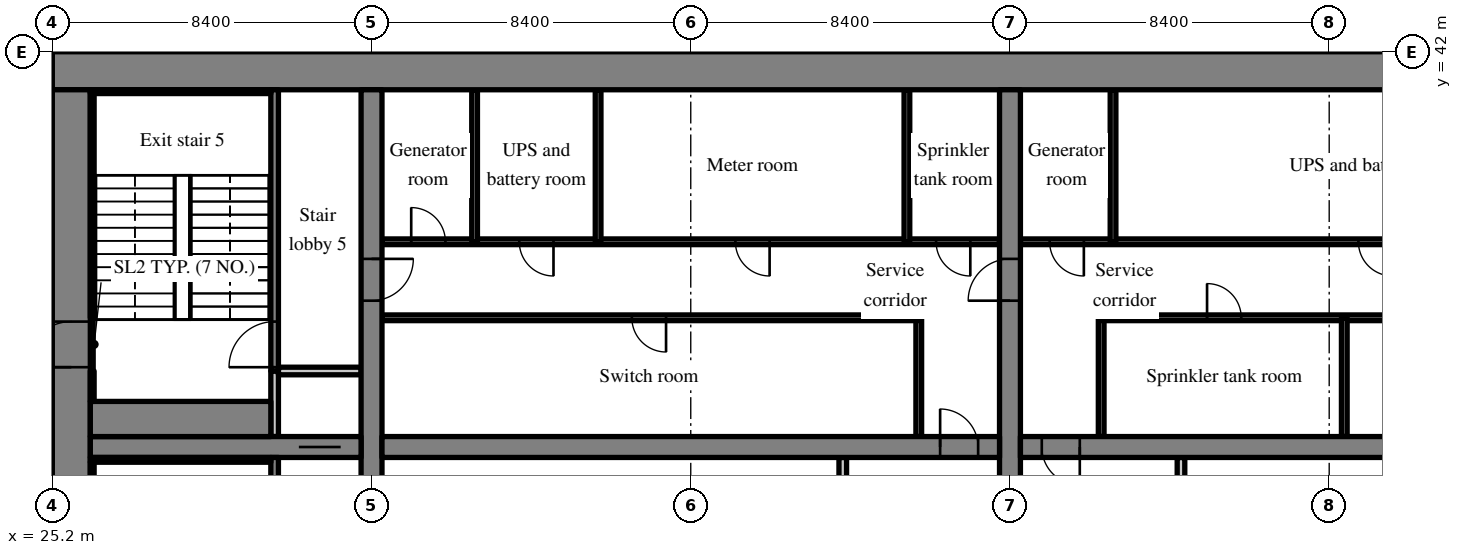
"""IFC4 building model, lengths in metres.
Left out: names, types, materials, properties, quantities, classifications, styles, units other than length and angle.
Written with IfcOpenShell. Run it as: python <this file> out.ifc"""

import sys

from ifc_helpers import new_model, si_unit, direction, frame, frame_2d, origin, place, context, subcontext, project, spatial, rectangle, extrude, source, transform, mapped, element, fill, save


model = new_model("IFC4")
c1 = context("Model", 3, precision=1e-05, world=origin(), true_north=direction((0.0, 1.0)))
c2 = subcontext(c1, "Body", "Model", "MODEL_VIEW")
j1 = project(units=[si_unit("LENGTHUNIT", "METRE"), si_unit("PLANEANGLEUNIT", "RADIAN")], contexts=[c1])
p1 = place(None, origin())
s1 = spatial("IfcSite", under=j1, at=p1, CompositionType="ELEMENT")
p2 = place(p1, origin())
s2 = spatial("IfcBuilding", under=s1, at=p2, CompositionType="ELEMENT")
p3 = place(p2, frame((0.0, 0.0, 81.0)))
s3 = spatial("IfcBuildingStorey", under=s2, at=p3, CompositionType="ELEMENT", Elevation=81.0)
m1 = source(origin(), c2, "Body", "SweptSolid", [
    extrude(rectangle(XDim=50.4, YDim=1.0, at=frame_2d((25.2, 0.0))), origin(), (0.0, 0.0, 1.0), 5.12),
])
p4 = place(p3, frame((25.2, 41.5, 0.0), z_axis=(0.0, 0.0, 1.0), x_axis=(1.0, 0.0, 0.0)))
e1 = element("IfcWall", 1, at=p4, inside=s3, PredefinedType="SHEAR", context=c2, shape_type="MappedRepresentation", body=[
    mapped(m1, transform((0.0, 0.0, 0.0), scale=1.0)),
])
m2 = source(origin(), c2, "Body", "SweptSolid", [
    extrude(rectangle(XDim=18.0, YDim=1.0, at=frame_2d((9.0, 0.0))), origin(), (0.0, 0.0, 1.0), 5.12),
])
p5 = place(p3, frame((25.7, 23.0, 0.0), z_axis=(0.0, 0.0, 1.0), x_axis=(0.0, 1.0, 0.0)))
e2 = element("IfcWall", 2, at=p5, inside=s3, PredefinedType="SHEAR", context=c2, shape_type="MappedRepresentation", body=[
    mapped(m2, transform((0.0, 0.0, 0.0), scale=1.0)),
])
m3 = source(origin(), c2, "Body", "SweptSolid", [
    extrude(rectangle(XDim=1.2, YDim=2.1, at=frame_2d((0.6, 1.05))), frame((0.0, 0.51, 0.0), z_axis=(0.0, -1.0, 0.0), x_axis=(1.0, 0.0, 0.0)), (0.0, 0.0, 1.0), 1.02),
])
p6 = place(p5, frame((10.7, 0.0, 0.0)))
e3 = element("IfcOpeningElement", 3, at=p6, cuts=e2, PredefinedType="OPENING", context=c2, shape_type="MappedRepresentation", body=[
    mapped(m3, transform((0.0, 0.0, 0.0), scale=1.0)),
])
m4 = source(origin(), c2, "Body", "SweptSolid", [
    extrude(rectangle(XDim=18.0, YDim=0.55, at=frame_2d((9.0, 0.0))), origin(), (0.0, 0.0, 1.0), 5.12),
])
p7 = place(p3, frame((33.6, 23.0, 0.0), z_axis=(0.0, 0.0, 1.0), x_axis=(0.0, 1.0, 0.0)))
e4 = element("IfcWall", 4, at=p7, inside=s3, PredefinedType="SHEAR", context=c2, shape_type="MappedRepresentation", body=[
    mapped(m4, transform((0.0, 0.0, 0.0), scale=1.0)),
])
m5 = source(origin(), c2, "Body", "SweptSolid", [
    extrude(rectangle(XDim=1.1, YDim=2.1, at=frame_2d((0.55, 1.05))), frame((0.0, 0.285, 0.0), z_axis=(0.0, -1.0, 0.0), x_axis=(1.0, 0.0, 0.0)), (0.0, 0.0, 1.0), 0.57),
])
p8 = place(p7, frame((12.45, 0.0, 0.0)))
e5 = element("IfcOpeningElement", 5, at=p8, cuts=e4, PredefinedType="OPENING", context=c2, shape_type="MappedRepresentation", body=[
    mapped(m5, transform((0.0, 0.0, 0.0), scale=1.0)),
])
p9 = place(p3, frame((50.4, 23.0, 0.0), z_axis=(0.0, 0.0, 1.0), x_axis=(0.0, 1.0, 0.0)))
e6 = element("IfcWall", 6, at=p9, inside=s3, PredefinedType="SHEAR", context=c2, shape_type="MappedRepresentation", body=[
    mapped(m4, transform((0.0, 0.0, 0.0), scale=1.0)),
])
p10 = place(p9, frame((12.45, 0.0, 0.0)))
e7 = element("IfcOpeningElement", 7, at=p10, cuts=e6, PredefinedType="OPENING", context=c2, shape_type="MappedRepresentation", body=[
    mapped(m5, transform((0.0, 0.0, 0.0), scale=1.0)),
])
m6 = source(origin(), c2, "Body", "SweptSolid", [
    extrude(rectangle(XDim=7.125, YDim=0.55, at=frame_2d((3.562, 0.0))), origin(), (0.0, 0.0, 1.0), 5.12),
])
p11 = place(p3, frame((26.2, 31.6, 0.0), z_axis=(0.0, 0.0, 1.0), x_axis=(1.0, 0.0, 0.0)))
e8 = element("IfcWall", 8, at=p11, inside=s3, PredefinedType="SHEAR", context=c2, shape_type="MappedRepresentation", body=[
    mapped(m6, transform((0.0, 0.0, 0.0), scale=1.0)),
])
p12 = place(p11, frame((5.488, 0.0, 0.0)))
e9 = element("IfcOpeningElement", 9, at=p12, cuts=e8, PredefinedType="OPENING", context=c2, shape_type="MappedRepresentation", body=[
    mapped(m5, transform((0.0, 0.0, 0.0), scale=1.0)),
])
m7 = source(origin(), c2, "Body", "SweptSolid", [
    extrude(rectangle(XDim=16.25, YDim=0.55, at=frame_2d((8.125, 0.0))), origin(), (0.0, 0.0, 1.0), 5.12),
])
p13 = place(p3, frame((33.875, 31.6, 0.0), z_axis=(0.0, 0.0, 1.0), x_axis=(1.0, 0.0, 0.0)))
e10 = element("IfcWall", 10, at=p13, inside=s3, PredefinedType="SHEAR", context=c2, shape_type="MappedRepresentation", body=[
    mapped(m7, transform((0.0, 0.0, 0.0), scale=1.0)),
])
m8 = source(origin(), c2, "Body", "SweptSolid", [
    extrude(rectangle(XDim=1.0, YDim=2.1, at=frame_2d((0.5, 1.05))), frame((0.0, 0.285, 0.0), z_axis=(0.0, -1.0, 0.0), x_axis=(1.0, 0.0, 0.0)), (0.0, 0.0, 1.0), 0.57),
])
p14 = place(p13, frame((14.687, 0.0, 0.0)))
e11 = element("IfcOpeningElement", 11, at=p14, cuts=e10, PredefinedType="OPENING", context=c2, shape_type="MappedRepresentation", body=[
    mapped(m8, transform((0.0, 0.0, 0.0), scale=1.0)),
])
p15 = place(p3, frame((50.675, 31.6, 0.0), z_axis=(0.0, 0.0, 1.0), x_axis=(1.0, 0.0, 0.0)))
e12 = element("IfcWall", 12, at=p15, inside=s3, PredefinedType="SHEAR", context=c2, shape_type="MappedRepresentation", body=[
    mapped(m7, transform((0.0, 0.0, 0.0), scale=1.0)),
])
p16 = place(p15, frame((0.562, 0.0, 0.0)))
e13 = element("IfcOpeningElement", 13, at=p16, cuts=e12, PredefinedType="OPENING", context=c2, shape_type="MappedRepresentation", body=[
    mapped(m8, transform((0.0, 0.0, 0.0), scale=1.0)),
])
m9 = source(origin(), c2, "Body", "SweptSolid", [
    extrude(rectangle(XDim=8.2, YDim=0.9, at=frame_2d((4.1, 0.0))), origin(), (0.0, 0.0, 1.0), 5.12),
])
p17 = place(p3, frame((17.0, 31.6, 0.0), z_axis=(0.0, 0.0, 1.0), x_axis=(1.0, 0.0, 0.0)))
e14 = element("IfcWall", 14, at=p17, inside=s3, PredefinedType="SHEAR", context=c2, shape_type="MappedRepresentation", body=[
    mapped(m9, transform((0.0, 0.0, 0.0), scale=1.0)),
])
m10 = source(origin(), c2, "Body", "SweptSolid", [
    extrude(rectangle(XDim=2.525, YDim=0.2, at=frame_2d((1.262, 0.0))), origin(), (0.0, 0.0, 1.0), 5.12),
])
p18 = place(p3, frame((46.0, 28.8, 0.0), z_axis=(0.0, 0.0, 1.0), x_axis=(0.0, 1.0, 0.0)))
e15 = element("IfcWall", 15, at=p18, inside=s3, PredefinedType="SOLIDWALL", context=c2, shape_type="MappedRepresentation", body=[
    mapped(m10, transform((0.0, 0.0, 0.0), scale=1.0)),
])
m11 = source(origin(), c2, "Body", "SweptSolid", [
    extrude(rectangle(XDim=3.125, YDim=0.15, at=frame_2d((1.562, 0.0))), origin(), (0.0, 0.0, 1.0), 5.12),
])
p19 = place(p3, frame((48.0, 31.875, 0.0), z_axis=(0.0, 0.0, 1.0), x_axis=(0.0, 1.0, 0.0)))
e16 = element("IfcWall", 16, at=p19, inside=s3, PredefinedType="PARTITIONING", context=c2, shape_type="MappedRepresentation", body=[
    mapped(m11, transform((0.0, 0.0, 0.0), scale=1.0)),
])
m12 = source(origin(), c2, "Body", "SweptSolid", [
    extrude(rectangle(XDim=14.125, YDim=0.15, at=frame_2d((7.062, 0.0))), origin(), (0.0, 0.0, 1.0), 5.12),
])
p20 = place(p3, frame((33.875, 35.0, 0.0), z_axis=(0.0, 0.0, 1.0), x_axis=(1.0, 0.0, 0.0)))
e17 = element("IfcWall", 17, at=p20, inside=s3, PredefinedType="PARTITIONING", context=c2, shape_type="MappedRepresentation", body=[
    mapped(m12, transform((0.0, 0.0, 0.0), scale=1.0)),
])
m13 = source(origin(), c2, "Body", "SweptSolid", [
    extrude(rectangle(XDim=0.9, YDim=2.1, at=frame_2d((0.45, 1.05))), frame((0.0, 0.085, 0.0), z_axis=(0.0, -1.0, 0.0), x_axis=(1.0, 0.0, 0.0)), (0.0, 0.0, 1.0), 0.17),
])
p21 = place(p20, frame((6.575, 0.0, 0.0)))
e18 = element("IfcOpeningElement", 18, at=p21, cuts=e17, PredefinedType="OPENING", context=c2, shape_type="MappedRepresentation", body=[
    mapped(m13, transform((0.0, 0.0, 0.0), scale=1.0)),
])
m14 = source(origin(), c2, "Body", "SweptSolid", [
    extrude(rectangle(XDim=16.25, YDim=0.15, at=frame_2d((8.125, 0.0))), origin(), (0.0, 0.0, 1.0), 5.12),
])
p22 = place(p3, frame((33.875, 37.0, 0.0), z_axis=(0.0, 0.0, 1.0), x_axis=(1.0, 0.0, 0.0)))
e19 = element("IfcWall", 19, at=p22, inside=s3, PredefinedType="PARTITIONING", context=c2, shape_type="MappedRepresentation", body=[
    mapped(m14, transform((0.0, 0.0, 0.0), scale=1.0)),
])
p23 = place(p22, frame((0.769, 0.0, 0.0)))
e20 = element("IfcOpeningElement", 20, at=p23, cuts=e19, PredefinedType="OPENING", context=c2, shape_type="MappedRepresentation", body=[
    mapped(m13, transform((0.0, 0.0, 0.0), scale=1.0)),
])
p24 = place(p22, frame((3.613, 0.0, 0.0)))
e21 = element("IfcOpeningElement", 21, at=p24, cuts=e19, PredefinedType="OPENING", context=c2, shape_type="MappedRepresentation", body=[
    mapped(m13, transform((0.0, 0.0, 0.0), scale=1.0)),
])
p25 = place(p22, frame((9.3, 0.0, 0.0)))
e22 = element("IfcOpeningElement", 22, at=p25, cuts=e19, PredefinedType="OPENING", context=c2, shape_type="MappedRepresentation", body=[
    mapped(m13, transform((0.0, 0.0, 0.0), scale=1.0)),
])
p26 = place(p22, frame((14.581, 0.0, 0.0)))
e23 = element("IfcOpeningElement", 23, at=p26, cuts=e19, PredefinedType="OPENING", context=c2, shape_type="MappedRepresentation", body=[
    mapped(m13, transform((0.0, 0.0, 0.0), scale=1.0)),
])
m15 = source(origin(), c2, "Body", "SweptSolid", [
    extrude(rectangle(XDim=4.0, YDim=0.15, at=frame_2d((2.0, 0.0))), origin(), (0.0, 0.0, 1.0), 5.12),
])
for number, where, z_axis, x_axis in (
    (24, (36.312, 37.0, 0.0), (0.0, 0.0, 1.0), (0.0, 1.0, 0.0)),
    (25, (39.562, 37.0, 0.0), (0.0, 0.0, 1.0), (0.0, 1.0, 0.0)),
    (26, (47.688, 37.0, 0.0), (0.0, 0.0, 1.0), (0.0, 1.0, 0.0)),
):
    element("IfcWall", number, at=place(p3, frame(where, z_axis=z_axis, x_axis=x_axis)), inside=s3, PredefinedType="PARTITIONING", context=c2, shape_type="MappedRepresentation", body=[
        mapped(m15, transform((0.0, 0.0, 0.0), scale=1.0)),
    ])
m16 = source(origin(), c2, "Body", "SweptSolid", [
    extrude(rectangle(XDim=8.325, YDim=0.2, at=frame_2d((4.163, 0.0))), origin(), (0.0, 0.0, 1.0), 5.12),
])
p27 = place(p3, frame((54.9, 23.0, 0.0), z_axis=(0.0, 0.0, 1.0), x_axis=(0.0, 1.0, 0.0)))
e27 = element("IfcWall", 27, at=p27, inside=s3, PredefinedType="PARTITIONING", context=c2, shape_type="MappedRepresentation", body=[
    mapped(m16, transform((0.0, 0.0, 0.0), scale=1.0)),
])
p28 = place(p3, frame((52.8, 31.875, 0.0), z_axis=(0.0, 0.0, 1.0), x_axis=(0.0, 1.0, 0.0)))
e28 = element("IfcWall", 28, at=p28, inside=s3, PredefinedType="PARTITIONING", context=c2, shape_type="MappedRepresentation", body=[
    mapped(m11, transform((0.0, 0.0, 0.0), scale=1.0)),
])
p29 = place(p3, frame((66.925, 35.0, 0.0), z_axis=(0.0, 0.0, 1.0), x_axis=(-1.0, 0.0, 0.0)))
e29 = element("IfcWall", 29, at=p29, inside=s3, PredefinedType="PARTITIONING", context=c2, shape_type="MappedRepresentation", body=[
    mapped(m12, transform((0.0, 0.0, 0.0), scale=1.0)),
])
p30 = place(p29, frame((3.414, 0.0, 0.0)))
e30 = element("IfcOpeningElement", 30, at=p30, cuts=e29, PredefinedType="OPENING", context=c2, shape_type="MappedRepresentation", body=[
    mapped(m13, transform((0.0, 0.0, 0.0), scale=1.0)),
])
p31 = place(p29, frame((10.439, 0.0, 0.0)))
e31 = element("IfcOpeningElement", 31, at=p31, cuts=e29, PredefinedType="OPENING", context=c2, shape_type="MappedRepresentation", body=[
    mapped(m13, transform((0.0, 0.0, 0.0), scale=1.0)),
])
p32 = place(p3, frame((66.925, 37.0, 0.0), z_axis=(0.0, 0.0, 1.0), x_axis=(-1.0, 0.0, 0.0)))
e32 = element("IfcWall", 32, at=p32, inside=s3, PredefinedType="PARTITIONING", context=c2, shape_type="MappedRepresentation", body=[
    mapped(m14, transform((0.0, 0.0, 0.0), scale=1.0)),
])
p33 = place(p32, frame((6.456, 0.0, 0.0)))
e33 = element("IfcOpeningElement", 33, at=p33, cuts=e32, PredefinedType="OPENING", context=c2, shape_type="MappedRepresentation", body=[
    mapped(m13, transform((0.0, 0.0, 0.0), scale=1.0)),
])
p34 = place(p32, frame((14.581, 0.0, 0.0)))
e34 = element("IfcOpeningElement", 34, at=p34, cuts=e32, PredefinedType="OPENING", context=c2, shape_type="MappedRepresentation", body=[
    mapped(m13, transform((0.0, 0.0, 0.0), scale=1.0)),
])
p35 = place(p3, frame((59.197, 31.875, 0.0), z_axis=(0.0, 0.0, 1.0), x_axis=(0.0, 1.0, 0.0)))
e35 = element("IfcWall", 35, at=p35, inside=s3, PredefinedType="PARTITIONING", context=c2, shape_type="MappedRepresentation", body=[
    mapped(m11, transform((0.0, 0.0, 0.0), scale=1.0)),
])
p36 = place(p3, frame((53.112, 37.0, 0.0), z_axis=(0.0, 0.0, 1.0), x_axis=(0.0, 1.0, 0.0)))
e36 = element("IfcWall", 36, at=p36, inside=s3, PredefinedType="PARTITIONING", context=c2, shape_type="MappedRepresentation", body=[
    mapped(m15, transform((0.0, 0.0, 0.0), scale=1.0)),
])
m17 = source(origin(), c2, "Body", "SweptSolid", [
    extrude(rectangle(XDim=8.325, YDim=0.2, at=frame_2d((4.163, 0.0))), origin(), (0.0, 0.0, 1.0), 5.12),
])
p37 = place(p3, frame((31.05, 23.0, 0.0), z_axis=(0.0, 0.0, 1.0), x_axis=(0.0, 1.0, 0.0)))
e37 = element("IfcWall", 37, at=p37, inside=s3, PredefinedType="SOLIDWALL", context=c2, shape_type="MappedRepresentation", body=[
    mapped(m17, transform((0.0, 0.0, 0.0), scale=1.0)),
])
m18 = source(origin(), c2, "Body", "SweptSolid", [
    extrude(rectangle(XDim=1.2, YDim=2.1, at=frame_2d((0.6, 1.05))), frame((0.0, 0.11, 0.0), z_axis=(0.0, -1.0, 0.0), x_axis=(1.0, 0.0, 0.0)), (0.0, 0.0, 1.0), 0.22),
])
p38 = place(p37, frame((0.6, 0.0, 0.0)))
e38 = element("IfcOpeningElement", 38, at=p38, cuts=e37, PredefinedType="OPENING", context=c2, shape_type="MappedRepresentation", body=[
    mapped(m18, transform((0.0, 0.0, 0.0), scale=1.0)),
])
m19 = source(origin(), c2, "Body", "SweptSolid", [
    extrude(rectangle(XDim=1.725, YDim=0.2, at=frame_2d((0.863, 0.0))), origin(), (0.0, 0.0, 1.0), 5.12),
])
p39 = place(p3, frame((31.05, 31.875, 0.0), z_axis=(0.0, 0.0, 1.0), x_axis=(0.0, 1.0, 0.0)))
e39 = element("IfcWall", 39, at=p39, inside=s3, PredefinedType="SOLIDWALL", context=c2, shape_type="MappedRepresentation", body=[
    mapped(m19, transform((0.0, 0.0, 0.0), scale=1.0)),
])
m20 = source(origin(), c2, "Body", "SweptSolid", [
    extrude(rectangle(XDim=2.175, YDim=0.2, at=frame_2d((1.087, 0.0))), origin(), (0.0, 0.0, 1.0), 5.12),
])
p40 = place(p3, frame((31.15, 33.6, 0.0), z_axis=(0.0, 0.0, 1.0), x_axis=(1.0, 0.0, 0.0)))
e40 = element("IfcWall", 40, at=p40, inside=s3, PredefinedType="SOLIDWALL", context=c2, shape_type="MappedRepresentation", body=[
    mapped(m20, transform((0.0, 0.0, 0.0), scale=1.0)),
])
m21 = source(origin(), c2, "Body", "SweptSolid", [
    extrude(rectangle(XDim=7.4, YDim=0.2, at=frame_2d((3.7, 0.0))), origin(), (0.0, 0.0, 1.0), 5.12),
])
p41 = place(p3, frame((31.05, 33.6, 0.0), z_axis=(0.0, 0.0, 1.0), x_axis=(0.0, 1.0, 0.0)))
e41 = element("IfcWall", 41, at=p41, inside=s3, PredefinedType="SOLIDWALL", context=c2, shape_type="MappedRepresentation", body=[
    mapped(m21, transform((0.0, 0.0, 0.0), scale=1.0)),
])
p42 = place(p41, frame((0.1, 0.0, 0.0)))
e42 = element("IfcOpeningElement", 42, at=p42, cuts=e41, PredefinedType="OPENING", context=c2, shape_type="MappedRepresentation", body=[
    mapped(m18, transform((0.0, 0.0, 0.0), scale=1.0)),
])
m22 = source(origin(), c2, "Body", "SweptSolid", [
    extrude(rectangle(XDim=4.75, YDim=0.125, at=frame_2d((2.375, 0.0))), origin(), (0.0, 0.0, 1.0), 5.12),
])
p43 = place(p3, frame((26.2, 31.262, 0.0), z_axis=(0.0, 0.0, 1.0), x_axis=(1.0, 0.0, 0.0)))
e43 = element("IfcWall", 43, at=p43, inside=s3, PredefinedType="SOLIDWALL", context=c2, shape_type="MappedRepresentation", body=[
    mapped(m22, transform((0.0, 0.0, 0.0), scale=1.0)),
])
m23 = source(origin(), c2, "Body", "SweptSolid", [
    extrude(rectangle(XDim=8.1, YDim=0.1, at=frame_2d((4.05, 0.0))), origin(), (0.0, 0.0, 1.0), 5.12),
])
p44 = place(p3, frame((26.25, 23.1, 0.0), z_axis=(0.0, 0.0, 1.0), x_axis=(0.0, 1.0, 0.0)))
e44 = element("IfcWall", 44, at=p44, inside=s3, PredefinedType="SOLIDWALL", context=c2, shape_type="MappedRepresentation", body=[
    mapped(m23, transform((0.0, 0.0, 0.0), scale=1.0)),
])
m24 = source(origin(), c2, "Body", "SweptSolid", [
    extrude(rectangle(XDim=4.75, YDim=0.1, at=frame_2d((2.375, 0.0))), origin(), (0.0, 0.0, 1.0), 5.12),
])
p45 = place(p3, frame((26.2, 40.95, 0.0), z_axis=(0.0, 0.0, 1.0), x_axis=(1.0, 0.0, 0.0)))
e45 = element("IfcWall", 45, at=p45, inside=s3, PredefinedType="SOLIDWALL", context=c2, shape_type="MappedRepresentation", body=[
    mapped(m24, transform((0.0, 0.0, 0.0), scale=1.0)),
])
m25 = source(origin(), c2, "Body", "SweptSolid", [
    extrude(rectangle(XDim=4.75, YDim=0.925, at=frame_2d((2.375, 0.0))), origin(), (0.0, 0.0, 1.0), 5.12),
])
p46 = place(p3, frame((26.2, 32.337, 0.0), z_axis=(0.0, 0.0, 1.0), x_axis=(1.0, 0.0, 0.0)))
e46 = element("IfcWall", 46, at=p46, inside=s3, PredefinedType="SOLIDWALL", context=c2, shape_type="MappedRepresentation", body=[
    mapped(m25, transform((0.0, 0.0, 0.0), scale=1.0)),
])
m26 = source(origin(), c2, "Body", "SweptSolid", [
    extrude(rectangle(XDim=0.8, YDim=0.1, at=frame_2d((0.4, 0.0))), origin(), (0.0, 0.0, 1.0), 5.12),
])
p47 = place(p3, frame((26.25, 32.8, 0.0), z_axis=(0.0, 0.0, 1.0), x_axis=(0.0, 1.0, 0.0)))
e47 = element("IfcWall", 47, at=p47, inside=s3, PredefinedType="SOLIDWALL", context=c2, shape_type="MappedRepresentation", body=[
    mapped(m26, transform((0.0, 0.0, 0.0), scale=1.0)),
])
m27 = source(origin(), c2, "Body", "SweptSolid", [
    extrude(rectangle(XDim=5.9, YDim=0.1, at=frame_2d((2.95, 0.0))), origin(), (0.0, 0.0, 1.0), 5.12),
])
p48 = place(p3, frame((26.25, 35.0, 0.0), z_axis=(0.0, 0.0, 1.0), x_axis=(0.0, 1.0, 0.0)))
e48 = element("IfcWall", 48, at=p48, inside=s3, PredefinedType="SOLIDWALL", context=c2, shape_type="MappedRepresentation", body=[
    mapped(m27, transform((0.0, 0.0, 0.0), scale=1.0)),
])
m28 = source(origin(), c2, "Body", "SweptSolid", [
    extrude(rectangle(XDim=1.0, YDim=2.1, at=frame_2d((0.5, 1.05))), frame((0.0, 0.025, 0.0), z_axis=(0.0, -1.0, 0.0), x_axis=(1.0, 0.0, 0.0)), (0.0, 0.0, 1.0), 0.05),
])
p49 = place(p14, origin())
e49 = element("IfcDoor", 49, at=p49, inside=s3, OperationType="SINGLE_SWING_LEFT", PredefinedType="DOOR", context=c2, shape_type="MappedRepresentation", body=[
    mapped(m28, transform((0.0, 0.0, 0.0), scale=1.0)),
])
fill(e11, e49)
m29 = source(origin(), c2, "Body", "SweptSolid", [
    extrude(rectangle(XDim=0.9, YDim=2.1, at=frame_2d((0.45, 1.05))), frame((0.0, 0.025, 0.0), z_axis=(0.0, -1.0, 0.0), x_axis=(1.0, 0.0, 0.0)), (0.0, 0.0, 1.0), 0.05),
])
p50 = place(p21, origin())
e50 = element("IfcDoor", 50, at=p50, inside=s3, OperationType="SINGLE_SWING_RIGHT", PredefinedType="DOOR", context=c2, shape_type="MappedRepresentation", body=[
    mapped(m29, transform((0.0, 0.0, 0.0), scale=1.0)),
])
fill(e18, e50)
p51 = place(p23, origin())
e51 = element("IfcDoor", 51, at=p51, inside=s3, OperationType="SINGLE_SWING_LEFT", PredefinedType="DOOR", context=c2, shape_type="MappedRepresentation", body=[
    mapped(m29, transform((0.0, 0.0, 0.0), scale=1.0)),
])
fill(e20, e51)
p52 = place(p24, origin())
e52 = element("IfcDoor", 52, at=p52, inside=s3, OperationType="SINGLE_SWING_RIGHT", PredefinedType="DOOR", context=c2, shape_type="MappedRepresentation", body=[
    mapped(m29, transform((0.0, 0.0, 0.0), scale=1.0)),
])
fill(e21, e52)
p53 = place(p25, origin())
e53 = element("IfcDoor", 53, at=p53, inside=s3, OperationType="SINGLE_SWING_RIGHT", PredefinedType="DOOR", context=c2, shape_type="MappedRepresentation", body=[
    mapped(m29, transform((0.0, 0.0, 0.0), scale=1.0)),
])
fill(e22, e53)
p54 = place(p26, origin())
e54 = element("IfcDoor", 54, at=p54, inside=s3, OperationType="SINGLE_SWING_RIGHT", PredefinedType="DOOR", context=c2, shape_type="MappedRepresentation", body=[
    mapped(m29, transform((0.0, 0.0, 0.0), scale=1.0)),
])
fill(e23, e54)
p55 = place(p16, origin())
e55 = element("IfcDoor", 55, at=p55, inside=s3, OperationType="SINGLE_SWING_RIGHT", PredefinedType="DOOR", context=c2, shape_type="MappedRepresentation", body=[
    mapped(m28, transform((0.0, 0.0, 0.0), scale=1.0)),
])
fill(e13, e55)
p56 = place(p31, origin())
e56 = element("IfcDoor", 56, at=p56, inside=s3, OperationType="SINGLE_SWING_RIGHT", PredefinedType="DOOR", context=c2, shape_type="MappedRepresentation", body=[
    mapped(m29, transform((0.0, 0.0, 0.0), scale=1.0)),
])
fill(e31, e56)
p57 = place(p33, origin())
e57 = element("IfcDoor", 57, at=p57, inside=s3, OperationType="SINGLE_SWING_LEFT", PredefinedType="DOOR", context=c2, shape_type="MappedRepresentation", body=[
    mapped(m29, transform((0.0, 0.0, 0.0), scale=1.0)),
])
fill(e33, e57)
p58 = place(p34, origin())
e58 = element("IfcDoor", 58, at=p58, inside=s3, OperationType="SINGLE_SWING_LEFT", PredefinedType="DOOR", context=c2, shape_type="MappedRepresentation", body=[
    mapped(m29, transform((0.0, 0.0, 0.0), scale=1.0)),
])
fill(e34, e58)
m30 = source(origin(), c2, "Body", "SweptSolid", [
    extrude(rectangle(XDim=1.1, YDim=2.1, at=frame_2d((0.55, 1.05))), frame((0.0, 0.025, 0.0), z_axis=(0.0, -1.0, 0.0), x_axis=(1.0, 0.0, 0.0)), (0.0, 0.0, 1.0), 0.05),
])
p59 = place(p12, origin())
e59 = element("IfcDoor", 59, at=p59, inside=s3, OperationType="SLIDING_TO_LEFT", PredefinedType="DOOR", context=c2, shape_type="MappedRepresentation", body=[
    mapped(m30, transform((0.0, 0.0, 0.0), scale=1.0)),
])
fill(e9, e59)
m31 = source(origin(), c2, "Body", "SweptSolid", [
    extrude(rectangle(XDim=1.2, YDim=2.1, at=frame_2d((0.6, 1.05))), frame((0.0, 0.025, 0.0), z_axis=(0.0, -1.0, 0.0), x_axis=(1.0, 0.0, 0.0)), (0.0, 0.0, 1.0), 0.05),
])
p60 = place(p42, origin())
e60 = element("IfcDoor", 60, at=p60, inside=s3, OperationType="SINGLE_SWING_LEFT", PredefinedType="DOOR", context=c2, shape_type="MappedRepresentation", body=[
    mapped(m31, transform((0.0, 0.0, 0.0), scale=1.0)),
])
fill(e42, e60)
p61 = place(p8, origin())
e61 = element("IfcDoor", 61, at=p61, inside=s3, OperationType="SINGLE_SWING_RIGHT", PredefinedType="DOOR", context=c2, shape_type="MappedRepresentation", body=[
    mapped(m30, transform((0.0, 0.0, 0.0), scale=1.0)),
])
fill(e5, e61)
p62 = place(p10, origin())
e62 = element("IfcDoor", 62, at=p62, inside=s3, OperationType="SINGLE_SWING_LEFT", PredefinedType="DOOR", context=c2, shape_type="MappedRepresentation", body=[
    mapped(m30, transform((0.0, 0.0, 0.0), scale=1.0)),
])
fill(e7, e62)
p63 = place(p6, origin())
e63 = element("IfcDoor", 63, at=p63, inside=s3, OperationType="SINGLE_SWING_LEFT", PredefinedType="DOOR", context=c2, shape_type="MappedRepresentation", body=[
    mapped(m31, transform((0.0, 0.0, 0.0), scale=1.0)),
])
fill(e3, e63)
save(model, sys.argv[1])
